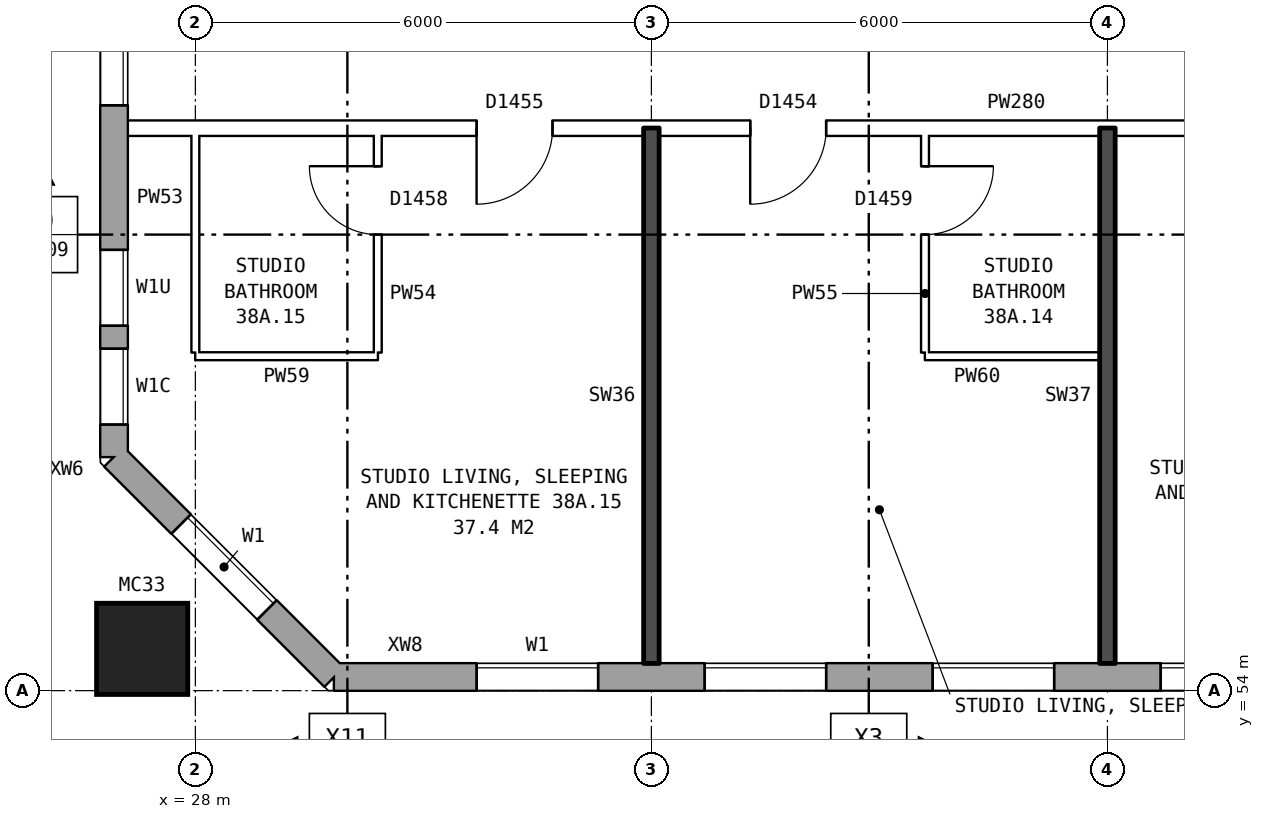
"""IFC4 building model, lengths in metres.
Left out: names, types, materials, properties, quantities, classifications, styles, units other than length and angle.
Written with IfcOpenShell. Run it as: python <this file> out.ifc"""

import sys

from ifc_helpers import new_model, si_unit, direction, frame, frame_2d, origin, origin_2d, place, context, subcontext, project, spatial, rectangle, hollow_rectangle, extrude, element, fill, save


model = new_model("IFC4")
c1 = context("Model", 3, precision=1e-05, world=origin(), true_north=direction((0.0, 1.0)))
c2 = subcontext(c1, "Body", "Model", "MODEL_VIEW")
j1 = project(units=[si_unit("LENGTHUNIT", "METRE"), si_unit("PLANEANGLEUNIT", "RADIAN")], contexts=[c1])
p1 = place(None, origin())
s1 = spatial("IfcSite", under=j1, at=p1, CompositionType="ELEMENT")
p2 = place(p1, origin())
s2 = spatial("IfcBuilding", under=s1, at=p2, CompositionType="ELEMENT")
p3 = place(p2, frame((0.0, 0.0, 136.1)))
s3 = spatial("IfcBuildingStorey", under=s2, at=p3, CompositionType="ELEMENT", Elevation=136.1)
p4 = place(p3, frame((27.3, 54.55, 0.0), z_axis=(0.0, 0.0, 1.0), x_axis=(1.0, 0.0, 0.0)))
e1 = element("IfcColumn", 1, at=p4, inside=s3, PredefinedType="COLUMN", context=c2, shape_type="SweptSolid", body=[
    extrude(hollow_rectangle(XDim=1.2, YDim=1.2, WallThickness=0.065, at=origin_2d()), origin(), (0.0, 0.0, 1.0), 3.1),
])
p5 = place(p3, frame((26.93, 57.075, 0.0), z_axis=(0.0, 0.0, 1.0), x_axis=(0.707106781187, -0.707106781187, 0.0)))
e2 = element("IfcWall", 2, at=p5, inside=s3, PredefinedType="STANDARD", context=c2, shape_type="SweptSolid", body=[
    extrude(rectangle(XDim=4.094, YDim=0.36, at=frame_2d((2.047, 0.0))), origin(), (0.0, 0.0, 1.0), 2.85),
])
p6 = place(p5, frame((1.247, 0.0, 0.8)))
e3 = element("IfcOpeningElement", 3, at=p6, cuts=e2, PredefinedType="OPENING", context=c2, shape_type="SweptSolid", body=[
    extrude(rectangle(XDim=1.6, YDim=1.8, at=frame_2d((0.8, 0.9))), frame((0.0, 0.19, 0.0), z_axis=(0.0, -1.0, 0.0), x_axis=(1.0, 0.0, 0.0)), (0.0, 0.0, 1.0), 0.38),
])
p7 = place(p3, frame((29.825, 54.18, 0.0), z_axis=(0.0, 0.0, 1.0), x_axis=(1.0, 0.0, 0.0)))
e4 = element("IfcWall", 4, at=p7, inside=s3, PredefinedType="STANDARD", context=c2, shape_type="SweptSolid", body=[
    extrude(rectangle(XDim=43.101, YDim=0.36, at=frame_2d((21.55, 0.0))), origin(), (0.0, 0.0, 1.0), 2.85),
])
p8 = place(p7, frame((1.875, 0.0, 0.8)))
e5 = element("IfcOpeningElement", 5, at=p8, cuts=e4, PredefinedType="OPENING", context=c2, shape_type="SweptSolid", body=[
    extrude(rectangle(XDim=1.6, YDim=1.8, at=frame_2d((0.8, 0.9))), frame((0.0, 0.19, 0.0), z_axis=(0.0, -1.0, 0.0), x_axis=(1.0, 0.0, 0.0)), (0.0, 0.0, 1.0), 0.38),
])
p9 = place(p7, frame((4.875, 0.0, 0.8)))
e6 = element("IfcOpeningElement", 6, at=p9, cuts=e4, PredefinedType="OPENING", context=c2, shape_type="SweptSolid", body=[
    extrude(rectangle(XDim=1.6, YDim=1.8, at=frame_2d((0.8, 0.9))), frame((0.0, 0.19, 0.0), z_axis=(0.0, -1.0, 0.0), x_axis=(1.0, 0.0, 0.0)), (0.0, 0.0, 1.0), 0.38),
])
p10 = place(p7, frame((7.875, 0.0, 0.8)))
e7 = element("IfcOpeningElement", 7, at=p10, cuts=e4, PredefinedType="OPENING", context=c2, shape_type="SweptSolid", body=[
    extrude(rectangle(XDim=1.6, YDim=1.8, at=frame_2d((0.8, 0.9))), frame((0.0, 0.19, 0.0), z_axis=(0.0, -1.0, 0.0), x_axis=(1.0, 0.0, 0.0)), (0.0, 0.0, 1.0), 0.38),
])
p11 = place(p7, frame((10.875, 0.0, 0.8)))
e8 = element("IfcOpeningElement", 8, at=p11, cuts=e4, PredefinedType="OPENING", context=c2, shape_type="SweptSolid", body=[
    extrude(rectangle(XDim=1.6, YDim=1.8, at=frame_2d((0.8, 0.9))), frame((0.0, 0.19, 0.0), z_axis=(0.0, -1.0, 0.0), x_axis=(1.0, 0.0, 0.0)), (0.0, 0.0, 1.0), 0.38),
])
p12 = place(p7, frame((13.875, 0.0, 0.8)))
e9 = element("IfcOpeningElement", 9, at=p12, cuts=e4, PredefinedType="OPENING", context=c2, shape_type="SweptSolid", body=[
    extrude(rectangle(XDim=1.6, YDim=1.8, at=frame_2d((0.8, 0.9))), frame((0.0, 0.19, 0.0), z_axis=(0.0, -1.0, 0.0), x_axis=(1.0, 0.0, 0.0)), (0.0, 0.0, 1.0), 0.38),
])
p13 = place(p7, frame((16.975, 0.0, 0.15)))
e10 = element("IfcOpeningElement", 10, at=p13, cuts=e4, PredefinedType="OPENING", context=c2, shape_type="SweptSolid", body=[
    extrude(rectangle(XDim=0.6, YDim=0.9, at=frame_2d((0.3, 0.45))), frame((0.0, 0.19, 0.0), z_axis=(0.0, -1.0, 0.0), x_axis=(1.0, 0.0, 0.0)), (0.0, 0.0, 1.0), 0.38),
])
p14 = place(p7, frame((19.875, 0.0, 0.8)))
e11 = element("IfcOpeningElement", 11, at=p14, cuts=e4, PredefinedType="OPENING", context=c2, shape_type="SweptSolid", body=[
    extrude(rectangle(XDim=1.6, YDim=1.8, at=frame_2d((0.8, 0.9))), frame((0.0, 0.19, 0.0), z_axis=(0.0, -1.0, 0.0), x_axis=(1.0, 0.0, 0.0)), (0.0, 0.0, 1.0), 0.38),
])
p15 = place(p7, frame((22.875, 0.0, 0.8)))
e12 = element("IfcOpeningElement", 12, at=p15, cuts=e4, PredefinedType="OPENING", context=c2, shape_type="SweptSolid", body=[
    extrude(rectangle(XDim=1.6, YDim=1.8, at=frame_2d((0.8, 0.9))), frame((0.0, 0.19, 0.0), z_axis=(0.0, -1.0, 0.0), x_axis=(1.0, 0.0, 0.0)), (0.0, 0.0, 1.0), 0.38),
])
p16 = place(p7, frame((25.325, 0.0, 0.15)))
e13 = element("IfcOpeningElement", 13, at=p16, cuts=e4, PredefinedType="OPENING", context=c2, shape_type="SweptSolid", body=[
    extrude(rectangle(XDim=0.8, YDim=0.9, at=frame_2d((0.4, 0.45))), frame((0.0, 0.19, 0.0), z_axis=(0.0, -1.0, 0.0), x_axis=(1.0, 0.0, 0.0)), (0.0, 0.0, 1.0), 0.38),
])
p17 = place(p7, frame((28.875, 0.0, 0.8)))
e14 = element("IfcOpeningElement", 14, at=p17, cuts=e4, PredefinedType="OPENING", context=c2, shape_type="SweptSolid", body=[
    extrude(rectangle(XDim=1.6, YDim=1.8, at=frame_2d((0.8, 0.9))), frame((0.0, 0.19, 0.0), z_axis=(0.0, -1.0, 0.0), x_axis=(1.0, 0.0, 0.0)), (0.0, 0.0, 1.0), 0.38),
])
p18 = place(p7, frame((31.875, 0.0, 0.8)))
e15 = element("IfcOpeningElement", 15, at=p18, cuts=e4, PredefinedType="OPENING", context=c2, shape_type="SweptSolid", body=[
    extrude(rectangle(XDim=1.6, YDim=1.8, at=frame_2d((0.8, 0.9))), frame((0.0, 0.19, 0.0), z_axis=(0.0, -1.0, 0.0), x_axis=(1.0, 0.0, 0.0)), (0.0, 0.0, 1.0), 0.38),
])
p19 = place(p7, frame((34.875, 0.0, 0.8)))
e16 = element("IfcOpeningElement", 16, at=p19, cuts=e4, PredefinedType="OPENING", context=c2, shape_type="SweptSolid", body=[
    extrude(rectangle(XDim=1.6, YDim=1.8, at=frame_2d((0.8, 0.9))), frame((0.0, 0.19, 0.0), z_axis=(0.0, -1.0, 0.0), x_axis=(1.0, 0.0, 0.0)), (0.0, 0.0, 1.0), 0.38),
])
p20 = place(p7, frame((37.875, 0.0, 0.8)))
e17 = element("IfcOpeningElement", 17, at=p20, cuts=e4, PredefinedType="OPENING", context=c2, shape_type="SweptSolid", body=[
    extrude(rectangle(XDim=1.6, YDim=1.8, at=frame_2d((0.8, 0.9))), frame((0.0, 0.19, 0.0), z_axis=(0.0, -1.0, 0.0), x_axis=(1.0, 0.0, 0.0)), (0.0, 0.0, 1.0), 0.38),
])
p21 = place(p7, frame((40.875, 0.0, 0.8)))
e18 = element("IfcOpeningElement", 18, at=p21, cuts=e4, PredefinedType="OPENING", context=c2, shape_type="SweptSolid", body=[
    extrude(rectangle(XDim=1.6, YDim=1.8, at=frame_2d((0.8, 0.9))), frame((0.0, 0.19, 0.0), z_axis=(0.0, -1.0, 0.0), x_axis=(1.0, 0.0, 0.0)), (0.0, 0.0, 1.0), 0.38),
])
p22 = place(p7, frame((17.925, 0.0, 0.15)))
e19 = element("IfcOpeningElement", 19, at=p22, cuts=e4, PredefinedType="OPENING", context=c2, shape_type="SweptSolid", body=[
    extrude(rectangle(XDim=1.0, YDim=1.8, at=frame_2d((0.5, 0.9))), frame((0.0, 0.19, 0.0), z_axis=(0.0, -1.0, 0.0), x_axis=(1.0, 0.0, 0.0)), (0.0, 0.0, 1.0), 0.38),
])
p23 = place(p7, frame((26.975, 0.0, 1.35)))
e20 = element("IfcOpeningElement", 20, at=p23, cuts=e4, PredefinedType="OPENING", context=c2, shape_type="SweptSolid", body=[
    extrude(rectangle(XDim=1.0, YDim=1.2, at=frame_2d((0.5, 0.6))), frame((0.0, 0.19, 0.0), z_axis=(0.0, -1.0, 0.0), x_axis=(1.0, 0.0, 0.0)), (0.0, 0.0, 1.0), 0.38),
])
p24 = place(p3, frame((26.93, 82.925, 0.0), z_axis=(0.0, 0.0, 1.0), x_axis=(0.0, -1.0, 0.0)))
e21 = element("IfcWall", 21, at=p24, inside=s3, PredefinedType="STANDARD", context=c2, shape_type="SweptSolid", body=[
    extrude(rectangle(XDim=25.851, YDim=0.36, at=frame_2d((12.925, 0.0))), origin(), (0.0, 0.0, 1.0), 2.85),
])
p25 = place(p24, frame((0.3, 0.0, 0.8)))
e22 = element("IfcOpeningElement", 22, at=p25, cuts=e21, PredefinedType="OPENING", context=c2, shape_type="SweptSolid", body=[
    extrude(rectangle(XDim=1.2, YDim=1.8, at=frame_2d((0.6, 0.9))), frame((0.0, 0.19, 0.0), z_axis=(0.0, -1.0, 0.0), x_axis=(1.0, 0.0, 0.0)), (0.0, 0.0, 1.0), 0.38),
])
p26 = place(p24, frame((4.625, 0.0, 0.8)))
e23 = element("IfcOpeningElement", 23, at=p26, cuts=e21, PredefinedType="OPENING", context=c2, shape_type="SweptSolid", body=[
    extrude(rectangle(XDim=1.6, YDim=1.8, at=frame_2d((0.8, 0.9))), frame((0.0, 0.19, 0.0), z_axis=(0.0, -1.0, 0.0), x_axis=(1.0, 0.0, 0.0)), (0.0, 0.0, 1.0), 0.38),
])
p27 = place(p24, frame((7.625, 0.0, 0.8)))
e24 = element("IfcOpeningElement", 24, at=p27, cuts=e21, PredefinedType="OPENING", context=c2, shape_type="SweptSolid", body=[
    extrude(rectangle(XDim=1.6, YDim=1.8, at=frame_2d((0.8, 0.9))), frame((0.0, 0.19, 0.0), z_axis=(0.0, -1.0, 0.0), x_axis=(1.0, 0.0, 0.0)), (0.0, 0.0, 1.0), 0.38),
])
p28 = place(p24, frame((10.625, 0.0, 0.8)))
e25 = element("IfcOpeningElement", 25, at=p28, cuts=e21, PredefinedType="OPENING", context=c2, shape_type="SweptSolid", body=[
    extrude(rectangle(XDim=1.6, YDim=1.8, at=frame_2d((0.8, 0.9))), frame((0.0, 0.19, 0.0), z_axis=(0.0, -1.0, 0.0), x_axis=(1.0, 0.0, 0.0)), (0.0, 0.0, 1.0), 0.38),
])
p29 = place(p24, frame((13.625, 0.0, 0.8)))
e26 = element("IfcOpeningElement", 26, at=p29, cuts=e21, PredefinedType="OPENING", context=c2, shape_type="SweptSolid", body=[
    extrude(rectangle(XDim=1.6, YDim=1.8, at=frame_2d((0.8, 0.9))), frame((0.0, 0.19, 0.0), z_axis=(0.0, -1.0, 0.0), x_axis=(1.0, 0.0, 0.0)), (0.0, 0.0, 1.0), 0.38),
])
p30 = place(p24, frame((16.625, 0.0, 0.8)))
e27 = element("IfcOpeningElement", 27, at=p30, cuts=e21, PredefinedType="OPENING", context=c2, shape_type="SweptSolid", body=[
    extrude(rectangle(XDim=1.6, YDim=1.8, at=frame_2d((0.8, 0.9))), frame((0.0, 0.19, 0.0), z_axis=(0.0, -1.0, 0.0), x_axis=(1.0, 0.0, 0.0)), (0.0, 0.0, 1.0), 0.38),
])
p31 = place(p24, frame((19.625, 0.0, 0.8)))
e28 = element("IfcOpeningElement", 28, at=p31, cuts=e21, PredefinedType="OPENING", context=c2, shape_type="SweptSolid", body=[
    extrude(rectangle(XDim=1.6, YDim=1.8, at=frame_2d((0.8, 0.9))), frame((0.0, 0.19, 0.0), z_axis=(0.0, -1.0, 0.0), x_axis=(1.0, 0.0, 0.0)), (0.0, 0.0, 1.0), 0.38),
])
p32 = place(p24, frame((23.125, 0.0, 0.8)))
e29 = element("IfcOpeningElement", 29, at=p32, cuts=e21, PredefinedType="OPENING", context=c2, shape_type="SweptSolid", body=[
    extrude(rectangle(XDim=1.0, YDim=0.9, at=frame_2d((0.5, 0.45))), frame((0.0, 0.19, 0.0), z_axis=(0.0, -1.0, 0.0), x_axis=(1.0, 0.0, 0.0)), (0.0, 0.0, 1.0), 0.38),
])
p33 = place(p24, frame((1.8, 0.0, 0.8)))
e30 = element("IfcOpeningElement", 30, at=p33, cuts=e21, PredefinedType="OPENING", context=c2, shape_type="SweptSolid", body=[
    extrude(rectangle(XDim=0.8, YDim=0.9, at=frame_2d((0.4, 0.45))), frame((0.0, 0.19, 0.0), z_axis=(0.0, -1.0, 0.0), x_axis=(1.0, 0.0, 0.0)), (0.0, 0.0, 1.0), 0.38),
])
p34 = place(p24, frame((24.425, 0.0, 0.8)))
e31 = element("IfcOpeningElement", 31, at=p34, cuts=e21, PredefinedType="OPENING", context=c2, shape_type="SweptSolid", body=[
    extrude(rectangle(XDim=1.0, YDim=1.8, at=frame_2d((0.5, 0.9))), frame((0.0, 0.19, 0.0), z_axis=(0.0, -1.0, 0.0), x_axis=(1.0, 0.0, 0.0)), (0.0, 0.0, 1.0), 0.38),
])
p35 = place(p3, frame((28.0, 58.4, 0.0), z_axis=(0.0, 0.0, 1.0), x_axis=(1.0, 0.0, 0.0)))
e32 = element("IfcWall", 32, at=p35, inside=s3, PredefinedType="PARTITIONING", context=c2, shape_type="SweptSolid", body=[
    extrude(rectangle(XDim=2.4, YDim=0.1, at=frame_2d((1.2, 0.0))), origin(), (0.0, 0.0, 1.0), 2.85),
])
p36 = place(p3, frame((37.6, 58.4, 0.0), z_axis=(0.0, 0.0, 1.0), x_axis=(1.0, 0.0, 0.0)))
e33 = element("IfcWall", 33, at=p36, inside=s3, PredefinedType="PARTITIONING", context=c2, shape_type="SweptSolid", body=[
    extrude(rectangle(XDim=2.3, YDim=0.1, at=frame_2d((1.15, 0.0))), origin(), (0.0, 0.0, 1.0), 2.85),
])
p37 = place(p3, frame((27.11, 61.4, 0.0), z_axis=(0.0, 0.0, 1.0), x_axis=(1.0, 0.0, 0.0)))
e34 = element("IfcWall", 34, at=p37, inside=s3, PredefinedType="PARTITIONING", context=c2, shape_type="SweptSolid", body=[
    extrude(rectangle(XDim=18.79, YDim=0.2, at=frame_2d((9.395, 0.0))), origin(), (0.0, 0.0, 1.0), 2.85),
])
p38 = place(p37, frame((14.19, 0.0, 0.0)))
e35 = element("IfcOpeningElement", 35, at=p38, cuts=e34, PredefinedType="OPENING", context=c2, shape_type="SweptSolid", body=[
    extrude(rectangle(XDim=1.0, YDim=2.1, at=frame_2d((0.5, 1.05))), frame((0.0, 0.11, 0.0), z_axis=(0.0, -1.0, 0.0), x_axis=(1.0, 0.0, 0.0)), (0.0, 0.0, 1.0), 0.22),
])
p39 = place(p37, frame((8.19, 0.0, 0.0)))
e36 = element("IfcOpeningElement", 36, at=p39, cuts=e34, PredefinedType="OPENING", context=c2, shape_type="SweptSolid", body=[
    extrude(rectangle(XDim=1.0, YDim=2.1, at=frame_2d((0.5, 1.05))), frame((0.0, 0.11, 0.0), z_axis=(0.0, -1.0, 0.0), x_axis=(1.0, 0.0, 0.0)), (0.0, 0.0, 1.0), 0.22),
])
p40 = place(p37, frame((4.59, 0.0, 0.0)))
e37 = element("IfcOpeningElement", 37, at=p40, cuts=e34, PredefinedType="OPENING", context=c2, shape_type="SweptSolid", body=[
    extrude(rectangle(XDim=1.0, YDim=2.1, at=frame_2d((0.5, 1.05))), frame((0.0, 0.11, 0.0), z_axis=(0.0, -1.0, 0.0), x_axis=(1.0, 0.0, 0.0)), (0.0, 0.0, 1.0), 0.22),
])
p41 = place(p3, frame((28.0, 58.45, 0.0), z_axis=(0.0, 0.0, 1.0), x_axis=(0.0, 1.0, 0.0)))
e38 = element("IfcWall", 38, at=p41, inside=s3, PredefinedType="PARTITIONING", context=c2, shape_type="SweptSolid", body=[
    extrude(rectangle(XDim=2.85, YDim=0.1, at=frame_2d((1.425, 0.0))), origin(), (0.0, 0.0, 1.0), 2.85),
])
p42 = place(p3, frame((30.4, 58.45, 0.0), z_axis=(0.0, 0.0, 1.0), x_axis=(0.0, 1.0, 0.0)))
e39 = element("IfcWall", 39, at=p42, inside=s3, PredefinedType="PARTITIONING", context=c2, shape_type="SweptSolid", body=[
    extrude(rectangle(XDim=2.85, YDim=0.1, at=frame_2d((1.425, 0.0))), origin(), (0.0, 0.0, 1.0), 2.85),
])
p43 = place(p42, frame((1.55, 0.0, 0.0)))
e40 = element("IfcOpeningElement", 40, at=p43, cuts=e39, PredefinedType="OPENING", context=c2, shape_type="SweptSolid", body=[
    extrude(rectangle(XDim=0.9, YDim=2.1, at=frame_2d((0.45, 1.05))), frame((0.0, 0.06, 0.0), z_axis=(0.0, -1.0, 0.0), x_axis=(1.0, 0.0, 0.0)), (0.0, 0.0, 1.0), 0.12),
])
p44 = place(p3, frame((34.0, 54.36, 0.0), z_axis=(0.0, 0.0, 1.0), x_axis=(0.0, 1.0, 0.0)))
e41 = element("IfcWall", 41, at=p44, inside=s3, PredefinedType="SOLIDWALL", context=c2, shape_type="SweptSolid", body=[
    extrude(rectangle(XDim=7.04, YDim=0.2, at=frame_2d((3.52, 0.0))), origin(), (0.0, 0.0, 1.0), 2.85),
])
p45 = place(p3, frame((37.6, 58.45, 0.0), z_axis=(0.0, 0.0, 1.0), x_axis=(0.0, 1.0, 0.0)))
e42 = element("IfcWall", 42, at=p45, inside=s3, PredefinedType="PARTITIONING", context=c2, shape_type="SweptSolid", body=[
    extrude(rectangle(XDim=2.85, YDim=0.1, at=frame_2d((1.425, 0.0))), origin(), (0.0, 0.0, 1.0), 2.85),
])
p46 = place(p45, frame((1.55, 0.0, 0.0)))
e43 = element("IfcOpeningElement", 43, at=p46, cuts=e42, PredefinedType="OPENING", context=c2, shape_type="SweptSolid", body=[
    extrude(rectangle(XDim=0.9, YDim=2.1, at=frame_2d((0.45, 1.05))), frame((0.0, 0.06, 0.0), z_axis=(0.0, -1.0, 0.0), x_axis=(1.0, 0.0, 0.0)), (0.0, 0.0, 1.0), 0.12),
])
p47 = place(p3, frame((40.0, 54.36, 0.0), z_axis=(0.0, 0.0, 1.0), x_axis=(0.0, 1.0, 0.0)))
e44 = element("IfcWall", 44, at=p47, inside=s3, PredefinedType="SOLIDWALL", context=c2, shape_type="SweptSolid", body=[
    extrude(rectangle(XDim=7.04, YDim=0.2, at=frame_2d((3.52, 0.0))), origin(), (0.0, 0.0, 1.0), 2.85),
])
p48 = place(p6, origin())
e45 = element("IfcWindow", 45, at=p48, inside=s3, PartitioningType="SINGLE_PANEL", PredefinedType="WINDOW", context=c2, shape_type="SweptSolid", body=[
    extrude(rectangle(XDim=1.6, YDim=1.8, at=frame_2d((0.8, 0.9))), frame((0.0, 0.15, 0.0), z_axis=(0.0, -1.0, 0.0), x_axis=(1.0, 0.0, 0.0)), (0.0, 0.0, 1.0), 0.06),
])
fill(e3, e45)
p49 = place(p8, origin())
e46 = element("IfcWindow", 46, at=p49, inside=s3, PartitioningType="SINGLE_PANEL", PredefinedType="WINDOW", context=c2, shape_type="SweptSolid", body=[
    extrude(rectangle(XDim=1.6, YDim=1.8, at=frame_2d((0.8, 0.9))), frame((0.0, 0.15, 0.0), z_axis=(0.0, -1.0, 0.0), x_axis=(1.0, 0.0, 0.0)), (0.0, 0.0, 1.0), 0.06),
])
fill(e5, e46)
p50 = place(p9, origin())
e47 = element("IfcWindow", 47, at=p50, inside=s3, PartitioningType="SINGLE_PANEL", PredefinedType="WINDOW", context=c2, shape_type="SweptSolid", body=[
    extrude(rectangle(XDim=1.6, YDim=1.8, at=frame_2d((0.8, 0.9))), frame((0.0, 0.15, 0.0), z_axis=(0.0, -1.0, 0.0), x_axis=(1.0, 0.0, 0.0)), (0.0, 0.0, 1.0), 0.06),
])
fill(e6, e47)
p51 = place(p10, origin())
e48 = element("IfcWindow", 48, at=p51, inside=s3, PartitioningType="SINGLE_PANEL", PredefinedType="WINDOW", context=c2, shape_type="SweptSolid", body=[
    extrude(rectangle(XDim=1.6, YDim=1.8, at=frame_2d((0.8, 0.9))), frame((0.0, 0.15, 0.0), z_axis=(0.0, -1.0, 0.0), x_axis=(1.0, 0.0, 0.0)), (0.0, 0.0, 1.0), 0.06),
])
fill(e7, e48)
p52 = place(p11, origin())
e49 = element("IfcWindow", 49, at=p52, inside=s3, PartitioningType="SINGLE_PANEL", PredefinedType="WINDOW", context=c2, shape_type="SweptSolid", body=[
    extrude(rectangle(XDim=1.6, YDim=1.8, at=frame_2d((0.8, 0.9))), frame((0.0, 0.15, 0.0), z_axis=(0.0, -1.0, 0.0), x_axis=(1.0, 0.0, 0.0)), (0.0, 0.0, 1.0), 0.06),
])
fill(e8, e49)
p53 = place(p31, origin())
e50 = element("IfcWindow", 50, at=p53, inside=s3, PartitioningType="SINGLE_PANEL", PredefinedType="WINDOW", context=c2, shape_type="SweptSolid", body=[
    extrude(rectangle(XDim=1.6, YDim=1.8, at=frame_2d((0.8, 0.9))), frame((0.0, 0.15, 0.0), z_axis=(0.0, -1.0, 0.0), x_axis=(1.0, 0.0, 0.0)), (0.0, 0.0, 1.0), 0.06),
])
fill(e28, e50)
p54 = place(p32, origin())
e51 = element("IfcWindow", 51, at=p54, inside=s3, PartitioningType="SINGLE_PANEL", PredefinedType="WINDOW", context=c2, shape_type="SweptSolid", body=[
    extrude(rectangle(XDim=1.0, YDim=0.9, at=frame_2d((0.5, 0.45))), frame((0.0, 0.15, 0.0), z_axis=(0.0, -1.0, 0.0), x_axis=(1.0, 0.0, 0.0)), (0.0, 0.0, 1.0), 0.06),
])
fill(e29, e51)
p55 = place(p39, frame((1.0, 0.0, 0.0), z_axis=(0.0, 0.0, 1.0), x_axis=(-1.0, 0.0, 0.0)))
e52 = element("IfcDoor", 52, at=p55, inside=s3, OperationType="SINGLE_SWING_RIGHT", PredefinedType="DOOR", context=c2, shape_type="SweptSolid", body=[
    extrude(rectangle(XDim=1.0, YDim=2.1, at=frame_2d((0.5, 1.05))), frame((0.0, 0.025, 0.0), z_axis=(0.0, -1.0, 0.0), x_axis=(1.0, 0.0, 0.0)), (0.0, 0.0, 1.0), 0.05),
])
fill(e36, e52)
p56 = place(p46, frame((0.9, 0.0, 0.0), z_axis=(0.0, 0.0, 1.0), x_axis=(-1.0, 0.0, 0.0)))
e53 = element("IfcDoor", 53, at=p56, inside=s3, OperationType="SINGLE_SWING_LEFT", PredefinedType="DOOR", context=c2, shape_type="SweptSolid", body=[
    extrude(rectangle(XDim=0.9, YDim=2.1, at=frame_2d((0.45, 1.05))), frame((0.0, 0.025, 0.0), z_axis=(0.0, -1.0, 0.0), x_axis=(1.0, 0.0, 0.0)), (0.0, 0.0, 1.0), 0.05),
])
fill(e43, e53)
p57 = place(p40, frame((1.0, 0.0, 0.0), z_axis=(0.0, 0.0, 1.0), x_axis=(-1.0, 0.0, 0.0)))
e54 = element("IfcDoor", 54, at=p57, inside=s3, OperationType="SINGLE_SWING_RIGHT", PredefinedType="DOOR", context=c2, shape_type="SweptSolid", body=[
    extrude(rectangle(XDim=1.0, YDim=2.1, at=frame_2d((0.5, 1.05))), frame((0.0, 0.025, 0.0), z_axis=(0.0, -1.0, 0.0), x_axis=(1.0, 0.0, 0.0)), (0.0, 0.0, 1.0), 0.05),
])
fill(e37, e54)
p58 = place(p43, origin())
e55 = element("IfcDoor", 55, at=p58, inside=s3, OperationType="SINGLE_SWING_RIGHT", PredefinedType="DOOR", context=c2, shape_type="SweptSolid", body=[
    extrude(rectangle(XDim=0.9, YDim=2.1, at=frame_2d((0.45, 1.05))), frame((0.0, 0.025, 0.0), z_axis=(0.0, -1.0, 0.0), x_axis=(1.0, 0.0, 0.0)), (0.0, 0.0, 1.0), 0.05),
])
fill(e40, e55)
p59 = place(p34, origin())
e56 = element("IfcWindow", 56, at=p59, inside=s3, PartitioningType="SINGLE_PANEL", PredefinedType="WINDOW", context=c2, shape_type="SweptSolid", body=[
    extrude(rectangle(XDim=1.0, YDim=1.8, at=frame_2d((0.5, 0.9))), frame((0.0, 0.15, 0.0), z_axis=(0.0, -1.0, 0.0), x_axis=(1.0, 0.0, 0.0)), (0.0, 0.0, 1.0), 0.06),
])
fill(e31, e56)
save(model, sys.argv[1])
